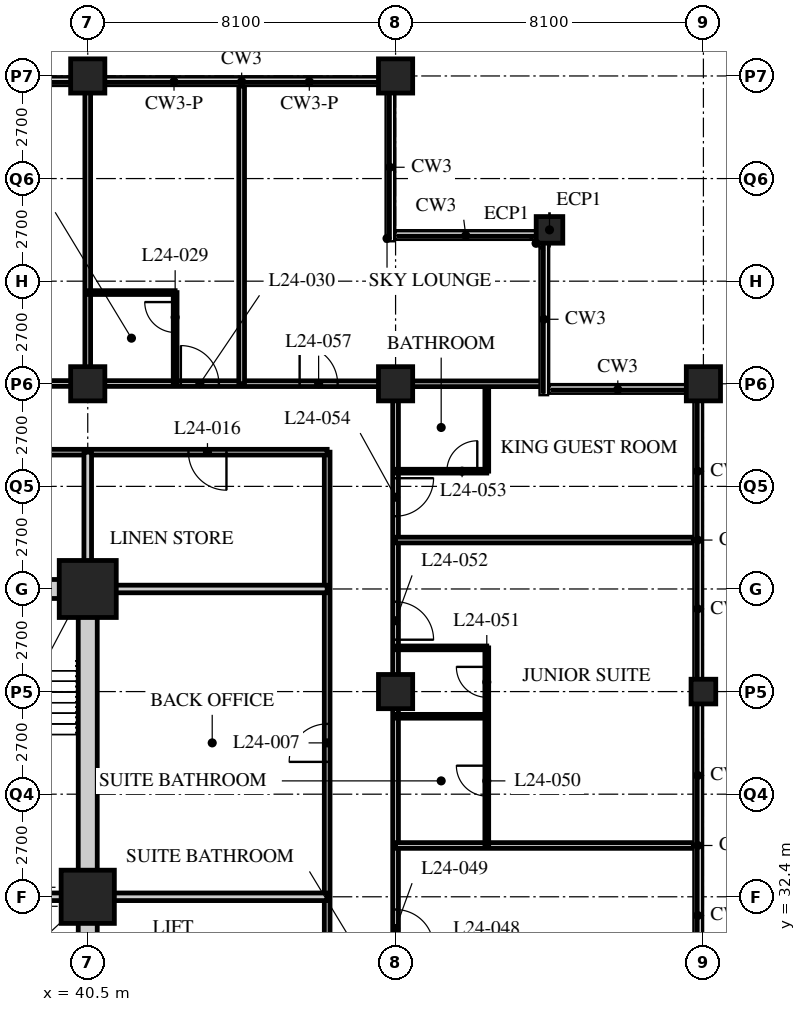
"""IFC4 building model, lengths in metres.
Left out: names, types, materials, properties, quantities, classifications, styles, units other than length and angle.
Written with IfcOpenShell. Run it as: python <this file> out.ifc"""

import sys

from ifc_helpers import new_model, si_unit, direction, frame, frame_2d, origin, origin_2d, place, context, subcontext, project, spatial, rectangle, hollow_rectangle, extrude, element, fill, save


model = new_model("IFC4")
c1 = context("Model", 3, precision=1e-05, world=origin(), true_north=direction((0.0, 1.0)))
c2 = subcontext(c1, "Body", "Model", "MODEL_VIEW")
j1 = project(units=[si_unit("LENGTHUNIT", "METRE"), si_unit("PLANEANGLEUNIT", "RADIAN")], contexts=[c1])
p1 = place(None, origin())
s1 = spatial("IfcSite", under=j1, at=p1, CompositionType="ELEMENT")
p2 = place(p1, origin())
s2 = spatial("IfcBuilding", under=s1, at=p2, CompositionType="ELEMENT")
p3 = place(p2, frame((0.0, 0.0, 98.0)))
s3 = spatial("IfcBuildingStorey", under=s2, at=p3, CompositionType="ELEMENT", Elevation=98.0)
p4 = place(p3, frame((40.5, 32.4, 0.0), z_axis=(0.0, 0.0, 1.0), x_axis=(1.0, 0.0, 0.0)))
e1 = element("IfcColumn", 1, at=p4, inside=s3, PredefinedType="COLUMN", context=c2, shape_type="SweptSolid", body=[
    extrude(hollow_rectangle(XDim=1.4, YDim=1.4, WallThickness=0.12, at=origin_2d()), origin(), (0.0, 0.0, 1.0), 5.4),
])
p5 = place(p3, frame((40.5, 40.5, 0.0), z_axis=(0.0, 0.0, 1.0), x_axis=(1.0, 0.0, 0.0)))
e2 = element("IfcColumn", 2, at=p5, inside=s3, PredefinedType="COLUMN", context=c2, shape_type="SweptSolid", body=[
    extrude(hollow_rectangle(XDim=1.5, YDim=1.5, WallThickness=0.13, at=origin_2d()), origin(), (0.0, 0.0, 1.0), 5.4),
])
p6 = place(p3, frame((40.5, 45.9, 0.0), z_axis=(0.0, 0.0, 1.0), x_axis=(1.0, 0.0, 0.0)))
e3 = element("IfcColumn", 3, at=p6, inside=s3, PredefinedType="COLUMN", context=c2, shape_type="SweptSolid", body=[
    extrude(hollow_rectangle(XDim=0.9, YDim=0.9, WallThickness=0.1, at=origin_2d()), origin(), (0.0, 0.0, 1.0), 5.4),
])
p7 = place(p3, frame((40.5, 54.0, 0.0), z_axis=(0.0, 0.0, 1.0), x_axis=(1.0, 0.0, 0.0)))
e4 = element("IfcColumn", 4, at=p7, inside=s3, PredefinedType="COLUMN", context=c2, shape_type="SweptSolid", body=[
    extrude(hollow_rectangle(XDim=0.9, YDim=0.9, WallThickness=0.09, at=origin_2d()), origin(), (0.0, 0.0, 1.0), 5.4),
])
for number, where, z_axis, x_axis in (
    (5, (48.6, 37.8, 0.0), (0.0, 0.0, 1.0), (1.0, 0.0, 0.0)),
    (6, (48.6, 45.9, 0.0), (0.0, 0.0, 1.0), (1.0, 0.0, 0.0)),
):
    element("IfcColumn", number, at=place(p3, frame(where, z_axis=z_axis, x_axis=x_axis)), inside=s3, PredefinedType="COLUMN", context=c2, shape_type="SweptSolid", body=[
        extrude(hollow_rectangle(XDim=0.9, YDim=0.9, WallThickness=0.1, at=origin_2d()), origin(), (0.0, 0.0, 1.0), 5.4),
    ])
p8 = place(p3, frame((48.6, 54.0, 0.0), z_axis=(0.0, 0.0, 1.0), x_axis=(1.0, 0.0, 0.0)))
e7 = element("IfcColumn", 7, at=p8, inside=s3, PredefinedType="COLUMN", context=c2, shape_type="SweptSolid", body=[
    extrude(hollow_rectangle(XDim=0.9, YDim=0.9, WallThickness=0.09, at=origin_2d()), origin(), (0.0, 0.0, 1.0), 5.4),
])
p9 = place(p3, frame((52.65, 49.95, 0.0), z_axis=(0.0, 0.0, 1.0), x_axis=(1.0, 0.0, 0.0)))
e8 = element("IfcColumn", 8, at=p9, inside=s3, PredefinedType="COLUMN", context=c2, shape_type="SweptSolid", body=[
    extrude(hollow_rectangle(XDim=0.7, YDim=0.7, WallThickness=0.07, at=origin_2d()), origin(), (0.0, 0.0, 1.0), 5.4),
])
p10 = place(p3, frame((56.7, 37.8, 0.0), z_axis=(0.0, 0.0, 1.0), x_axis=(1.0, 0.0, 0.0)))
e9 = element("IfcColumn", 9, at=p10, inside=s3, PredefinedType="COLUMN", context=c2, shape_type="SweptSolid", body=[
    extrude(hollow_rectangle(XDim=0.65, YDim=0.65, WallThickness=0.05, at=origin_2d()), origin(), (0.0, 0.0, 1.0), 5.4),
])
p11 = place(p3, frame((56.7, 45.9, 0.0), z_axis=(0.0, 0.0, 1.0), x_axis=(1.0, 0.0, 0.0)))
e10 = element("IfcColumn", 10, at=p11, inside=s3, PredefinedType="COLUMN", context=c2, shape_type="SweptSolid", body=[
    extrude(hollow_rectangle(XDim=0.9, YDim=0.9, WallThickness=0.09, at=origin_2d()), origin(), (0.0, 0.0, 1.0), 5.4),
])
p12 = place(p3, frame((8.1, 45.935, 0.0), z_axis=(0.0, 0.0, 1.0), x_axis=(0.99999962324, -0.000868055229, 0.0)))
e11 = element("IfcWall", 11, at=p12, inside=s3, PredefinedType="PARTITIONING", context=c2, shape_type="SweptSolid", body=[
    extrude(rectangle(XDim=40.5, YDim=0.15, at=frame_2d((20.25, 0.0))), origin(), (0.0, 0.0, 1.0), 4.49),
])
p13 = place(p12, frame((9.225, 0.0, 0.0)))
e12 = element("IfcOpeningElement", 12, at=p13, cuts=e11, PredefinedType="OPENING", context=c2, shape_type="SweptSolid", body=[
    extrude(rectangle(XDim=1.8, YDim=2.4, at=frame_2d((0.9, 1.2))), frame((0.0, 0.085, 0.0), z_axis=(0.0, -1.0, 0.0), x_axis=(1.0, 0.0, 0.0)), (0.0, 0.0, 1.0), 0.17),
])
p14 = place(p12, frame((21.65, 0.0, 0.0)))
e13 = element("IfcOpeningElement", 13, at=p14, cuts=e11, PredefinedType="OPENING", context=c2, shape_type="SweptSolid", body=[
    extrude(rectangle(XDim=1.0, YDim=2.1, at=frame_2d((0.5, 1.05))), frame((0.0, 0.085, 0.0), z_axis=(0.0, -1.0, 0.0), x_axis=(1.0, 0.0, 0.0)), (0.0, 0.0, 1.0), 0.17),
])
p15 = place(p12, frame((29.75, 0.0, 0.0)))
e14 = element("IfcOpeningElement", 14, at=p15, cuts=e11, PredefinedType="OPENING", context=c2, shape_type="SweptSolid", body=[
    extrude(rectangle(XDim=1.0, YDim=2.1, at=frame_2d((0.5, 1.05))), frame((0.0, 0.085, 0.0), z_axis=(0.0, -1.0, 0.0), x_axis=(1.0, 0.0, 0.0)), (0.0, 0.0, 1.0), 0.17),
])
p16 = place(p12, frame((34.85, 0.0, 0.0)))
e15 = element("IfcOpeningElement", 15, at=p16, cuts=e11, PredefinedType="OPENING", context=c2, shape_type="SweptSolid", body=[
    extrude(rectangle(XDim=1.0, YDim=2.1, at=frame_2d((0.5, 1.05))), frame((0.0, 0.085, 0.0), z_axis=(0.0, -1.0, 0.0), x_axis=(1.0, 0.0, 0.0)), (0.0, 0.0, 1.0), 0.17),
])
p17 = place(p12, frame((37.975, 0.0, 0.0)))
e16 = element("IfcOpeningElement", 16, at=p17, cuts=e11, PredefinedType="OPENING", context=c2, shape_type="SweptSolid", body=[
    extrude(rectangle(XDim=1.0, YDim=2.1, at=frame_2d((0.5, 1.05))), frame((0.0, 0.085, 0.0), z_axis=(0.0, -1.0, 0.0), x_axis=(1.0, 0.0, 0.0)), (0.0, 0.0, 1.0), 0.17),
])
p18 = place(p12, frame((1.525, 0.0, 0.0)))
e17 = element("IfcOpeningElement", 17, at=p18, cuts=e11, PredefinedType="OPENING", context=c2, shape_type="SweptSolid", body=[
    extrude(rectangle(XDim=1.0, YDim=2.1, at=frame_2d((0.5, 1.05))), frame((0.0, 0.085, 0.0), z_axis=(0.0, -1.0, 0.0), x_axis=(1.0, 0.0, 0.0)), (0.0, 0.0, 1.0), 0.17),
])
p19 = place(p3, frame((48.6, 13.465, 0.0), z_axis=(0.0, 0.0, 1.0), x_axis=(0.0, 1.0, 0.0)))
e18 = element("IfcWall", 18, at=p19, inside=s3, PredefinedType="PARTITIONING", context=c2, shape_type="SweptSolid", body=[
    extrude(rectangle(XDim=32.435, YDim=0.15, at=frame_2d((16.217, 0.0))), origin(), (0.0, 0.0, 1.0), 4.49),
])
p20 = place(p19, frame((1.525, 0.0, 0.0)))
e19 = element("IfcOpeningElement", 19, at=p20, cuts=e18, PredefinedType="OPENING", context=c2, shape_type="SweptSolid", body=[
    extrude(rectangle(XDim=1.0, YDim=2.1, at=frame_2d((0.5, 1.05))), frame((0.0, 0.085, 0.0), z_axis=(0.0, -1.0, 0.0), x_axis=(1.0, 0.0, 0.0)), (0.0, 0.0, 1.0), 0.17),
])
p21 = place(p19, frame((9.5, 0.0, 0.0)))
e20 = element("IfcOpeningElement", 20, at=p21, cuts=e18, PredefinedType="OPENING", context=c2, shape_type="SweptSolid", body=[
    extrude(rectangle(XDim=1.0, YDim=2.1, at=frame_2d((0.5, 1.05))), frame((0.0, 0.085, 0.0), z_axis=(0.0, -1.0, 0.0), x_axis=(1.0, 0.0, 0.0)), (0.0, 0.0, 1.0), 0.17),
])
p22 = place(p19, frame((17.6, 0.0, 0.0)))
e21 = element("IfcOpeningElement", 21, at=p22, cuts=e18, PredefinedType="OPENING", context=c2, shape_type="SweptSolid", body=[
    extrude(rectangle(XDim=1.0, YDim=2.1, at=frame_2d((0.5, 1.05))), frame((0.0, 0.085, 0.0), z_axis=(0.0, -1.0, 0.0), x_axis=(1.0, 0.0, 0.0)), (0.0, 0.0, 1.0), 0.17),
])
p23 = place(p19, frame((25.7, 0.0, 0.0)))
e22 = element("IfcOpeningElement", 22, at=p23, cuts=e18, PredefinedType="OPENING", context=c2, shape_type="SweptSolid", body=[
    extrude(rectangle(XDim=1.0, YDim=2.1, at=frame_2d((0.5, 1.05))), frame((0.0, 0.085, 0.0), z_axis=(0.0, -1.0, 0.0), x_axis=(1.0, 0.0, 0.0)), (0.0, 0.0, 1.0), 0.17),
])
p24 = place(p19, frame((28.95, 0.0, 0.0)))
e23 = element("IfcOpeningElement", 23, at=p24, cuts=e18, PredefinedType="OPENING", context=c2, shape_type="SweptSolid", body=[
    extrude(rectangle(XDim=1.0, YDim=2.1, at=frame_2d((0.5, 1.05))), frame((0.0, 0.085, 0.0), z_axis=(0.0, -1.0, 0.0), x_axis=(1.0, 0.0, 0.0)), (0.0, 0.0, 1.0), 0.17),
])
p25 = place(p3, frame((46.8, 15.3, 0.0), z_axis=(0.0, 0.0, 1.0), x_axis=(0.0, 1.0, 0.0)))
e24 = element("IfcWall", 24, at=p25, inside=s3, PredefinedType="PARTITIONING", context=c2, shape_type="SweptSolid", body=[
    extrude(rectangle(XDim=28.8, YDim=0.15, at=frame_2d((14.4, 0.0))), origin(), (0.0, 0.0, 1.0), 5.19),
])
p26 = place(p25, frame((9.775, 0.0, 0.0)))
e25 = element("IfcOpeningElement", 25, at=p26, cuts=e24, PredefinedType="OPENING", context=c2, shape_type="SweptSolid", body=[
    extrude(rectangle(XDim=0.85, YDim=2.1, at=frame_2d((0.425, 1.05))), frame((0.0, 0.085, 0.0), z_axis=(0.0, -1.0, 0.0), x_axis=(1.0, 0.0, 0.0)), (0.0, 0.0, 1.0), 0.17),
])
p27 = place(p25, frame((13.75, 0.0, 0.0)))
e26 = element("IfcOpeningElement", 26, at=p27, cuts=e24, PredefinedType="OPENING", context=c2, shape_type="SweptSolid", body=[
    extrude(rectangle(XDim=1.0, YDim=2.1, at=frame_2d((0.5, 1.05))), frame((0.0, 0.085, 0.0), z_axis=(0.0, -1.0, 0.0), x_axis=(1.0, 0.0, 0.0)), (0.0, 0.0, 1.0), 0.17),
])
p28 = place(p25, frame((20.65, 0.0, 0.0)))
e27 = element("IfcOpeningElement", 27, at=p28, cuts=e24, PredefinedType="OPENING", context=c2, shape_type="SweptSolid", body=[
    extrude(rectangle(XDim=1.0, YDim=2.1, at=frame_2d((0.5, 1.05))), frame((0.0, 0.085, 0.0), z_axis=(0.0, -1.0, 0.0), x_axis=(1.0, 0.0, 0.0)), (0.0, 0.0, 1.0), 0.17),
])
p29 = place(p3, frame((46.8, 44.1, 0.0), z_axis=(0.0, 0.0, 1.0), x_axis=(-1.0, 0.0, 0.0)))
e28 = element("IfcWall", 28, at=p29, inside=s3, PredefinedType="PARTITIONING", context=c2, shape_type="SweptSolid", body=[
    extrude(rectangle(XDim=17.24, YDim=0.15, at=frame_2d((8.62, 0.0))), origin(), (0.0, 0.0, 1.0), 5.19),
])
p30 = place(p29, frame((11.275, 0.0, 0.0)))
e29 = element("IfcOpeningElement", 29, at=p30, cuts=e28, PredefinedType="OPENING", context=c2, shape_type="SweptSolid", body=[
    extrude(rectangle(XDim=1.0, YDim=2.1, at=frame_2d((0.5, 1.05))), frame((0.0, 0.085, 0.0), z_axis=(0.0, -1.0, 0.0), x_axis=(1.0, 0.0, 0.0)), (0.0, 0.0, 1.0), 0.17),
])
p31 = place(p29, frame((2.65, 0.0, 0.0)))
e30 = element("IfcOpeningElement", 30, at=p31, cuts=e28, PredefinedType="OPENING", context=c2, shape_type="SweptSolid", body=[
    extrude(rectangle(XDim=1.0, YDim=2.1, at=frame_2d((0.5, 1.05))), frame((0.0, 0.085, 0.0), z_axis=(0.0, -1.0, 0.0), x_axis=(1.0, 0.0, 0.0)), (0.0, 0.0, 1.0), 0.17),
])
p32 = place(p3, frame((40.5, 32.4, 0.0), z_axis=(0.0, 0.0, 1.0), x_axis=(1.0, 0.0, 0.0)))
e31 = element("IfcWall", 31, at=p32, inside=s3, PredefinedType="SOLIDWALL", context=c2, shape_type="SweptSolid", body=[
    extrude(rectangle(XDim=6.3, YDim=0.2, at=frame_2d((3.15, 0.0))), origin(), (0.0, 0.0, 1.0), 5.19),
])
p33 = place(p3, frame((40.5, 40.5, 0.0), z_axis=(0.0, 0.0, 1.0), x_axis=(0.0, 1.0, 0.0)))
e32 = element("IfcWall", 32, at=p33, inside=s3, PredefinedType="SOLIDWALL", context=c2, shape_type="SweptSolid", body=[
    extrude(rectangle(XDim=3.6, YDim=0.2, at=frame_2d((1.8, 0.0))), origin(), (0.0, 0.0, 1.0), 4.49),
])
p34 = place(p3, frame((40.5, 40.5, 0.0), z_axis=(0.0, 0.0, 1.0), x_axis=(1.0, 0.0, 0.0)))
e33 = element("IfcWall", 33, at=p34, inside=s3, PredefinedType="SOLIDWALL", context=c2, shape_type="SweptSolid", body=[
    extrude(rectangle(XDim=6.3, YDim=0.2, at=frame_2d((3.15, 0.0))), origin(), (0.0, 0.0, 1.0), 5.19),
])
p35 = place(p3, frame((40.5, 45.9, 0.0), z_axis=(0.0, 0.0, 1.0), x_axis=(0.0, 1.0, 0.0)))
e34 = element("IfcWall", 34, at=p35, inside=s3, PredefinedType="PARTITIONING", context=c2, shape_type="SweptSolid", body=[
    extrude(rectangle(XDim=7.8, YDim=0.15, at=frame_2d((3.9, 0.0))), origin(), (0.0, 0.0, 1.0), 4.49),
])
p36 = place(p3, frame((40.5, 48.3, 0.0), z_axis=(0.0, 0.0, 1.0), x_axis=(1.0, 0.0, 0.0)))
e35 = element("IfcWall", 35, at=p36, inside=s3, PredefinedType="PARTITIONING", context=c2, shape_type="SweptSolid", body=[
    extrude(rectangle(XDim=2.3, YDim=0.1, at=frame_2d((1.15, 0.0))), origin(), (0.0, 0.0, 1.0), 5.19),
])
p37 = place(p3, frame((42.8, 45.9, 0.0), z_axis=(0.0, 0.0, 1.0), x_axis=(0.0, 1.0, 0.0)))
e36 = element("IfcWall", 36, at=p37, inside=s3, PredefinedType="PARTITIONING", context=c2, shape_type="SweptSolid", body=[
    extrude(rectangle(XDim=2.4, YDim=0.1, at=frame_2d((1.2, 0.0))), origin(), (0.0, 0.0, 1.0), 5.19),
])
p38 = place(p37, frame((1.35, 0.0, 0.0)))
e37 = element("IfcOpeningElement", 37, at=p38, cuts=e36, PredefinedType="OPENING", context=c2, shape_type="SweptSolid", body=[
    extrude(rectangle(XDim=0.8, YDim=2.1, at=frame_2d((0.4, 1.05))), frame((0.0, 0.06, 0.0), z_axis=(0.0, -1.0, 0.0), x_axis=(1.0, 0.0, 0.0)), (0.0, 0.0, 1.0), 0.12),
])
p39 = place(p3, frame((48.6, 33.75, 0.0), z_axis=(0.0, 0.0, 1.0), x_axis=(1.0, 0.0, 0.0)))
e38 = element("IfcWall", 38, at=p39, inside=s3, PredefinedType="PARTITIONING", context=c2, shape_type="SweptSolid", body=[
    extrude(rectangle(XDim=7.834, YDim=0.15, at=frame_2d((3.917, 0.0))), origin(), (0.0, 0.0, 1.0), 5.19),
])
p40 = place(p3, frame((51.0, 33.75, 0.0), z_axis=(0.0, 0.0, 1.0), x_axis=(0.0, 1.0, 0.0)))
e39 = element("IfcWall", 39, at=p40, inside=s3, PredefinedType="PARTITIONING", context=c2, shape_type="SweptSolid", body=[
    extrude(rectangle(XDim=5.2, YDim=0.1, at=frame_2d((2.6, 0.0))), origin(), (0.0, 0.0, 1.0), 5.19),
])
p41 = place(p40, frame((1.3, 0.0, 0.0)))
e40 = element("IfcOpeningElement", 40, at=p41, cuts=e39, PredefinedType="OPENING", context=c2, shape_type="SweptSolid", body=[
    extrude(rectangle(XDim=0.8, YDim=2.1, at=frame_2d((0.4, 1.05))), frame((0.0, 0.06, 0.0), z_axis=(0.0, -1.0, 0.0), x_axis=(1.0, 0.0, 0.0)), (0.0, 0.0, 1.0), 0.12),
])
p42 = place(p40, frame((3.9, 0.0, 0.0)))
e41 = element("IfcOpeningElement", 41, at=p42, cuts=e39, PredefinedType="OPENING", context=c2, shape_type="SweptSolid", body=[
    extrude(rectangle(XDim=0.8, YDim=2.1, at=frame_2d((0.4, 1.05))), frame((0.0, 0.06, 0.0), z_axis=(0.0, -1.0, 0.0), x_axis=(1.0, 0.0, 0.0)), (0.0, 0.0, 1.0), 0.12),
])
for number, where, z_axis, x_axis in (
    (42, (48.6, 37.15, 0.0), (0.0, 0.0, 1.0), (1.0, 0.0, 0.0)),
    (43, (48.6, 38.95, 0.0), (0.0, 0.0, 1.0), (1.0, 0.0, 0.0)),
):
    element("IfcWall", number, at=place(p3, frame(where, z_axis=z_axis, x_axis=x_axis)), inside=s3, PredefinedType="PARTITIONING", context=c2, shape_type="SweptSolid", body=[
        extrude(rectangle(XDim=2.4, YDim=0.1, at=frame_2d((1.2, 0.0))), origin(), (0.0, 0.0, 1.0), 5.19),
    ])
p43 = place(p3, frame((48.6, 41.788, 0.0), z_axis=(0.0, 0.0, 1.0), x_axis=(1.0, 0.0, 0.0)))
e44 = element("IfcWall", 44, at=p43, inside=s3, PredefinedType="PARTITIONING", context=c2, shape_type="SweptSolid", body=[
    extrude(rectangle(XDim=7.834, YDim=0.15, at=frame_2d((3.917, 0.0))), origin(), (0.0, 0.0, 1.0), 5.19),
])
p44 = place(p3, frame((51.0, 43.6, 0.0), z_axis=(0.0, 0.0, 1.0), x_axis=(0.0, 1.0, 0.0)))
e45 = element("IfcWall", 45, at=p44, inside=s3, PredefinedType="PARTITIONING", context=c2, shape_type="SweptSolid", body=[
    extrude(rectangle(XDim=2.3, YDim=0.1, at=frame_2d((1.15, 0.0))), origin(), (0.0, 0.0, 1.0), 5.19),
])
p45 = place(p3, frame((48.6, 43.6, 0.0), z_axis=(0.0, 0.0, 1.0), x_axis=(1.0, 0.0, 0.0)))
e46 = element("IfcWall", 46, at=p45, inside=s3, PredefinedType="PARTITIONING", context=c2, shape_type="SweptSolid", body=[
    extrude(rectangle(XDim=2.4, YDim=0.1, at=frame_2d((1.2, 0.0))), origin(), (0.0, 0.0, 1.0), 5.19),
])
p46 = place(p45, frame((1.35, 0.0, 0.0)))
e47 = element("IfcOpeningElement", 47, at=p46, cuts=e46, PredefinedType="OPENING", context=c2, shape_type="SweptSolid", body=[
    extrude(rectangle(XDim=0.8, YDim=2.1, at=frame_2d((0.4, 1.05))), frame((0.0, 0.06, 0.0), z_axis=(0.0, -1.0, 0.0), x_axis=(1.0, 0.0, 0.0)), (0.0, 0.0, 1.0), 0.12),
])
p47 = place(p3, frame((48.6, 45.9, 0.0), z_axis=(0.0, 0.0, 1.0), x_axis=(1.0, 0.0, 0.0)))
e48 = element("IfcWall", 48, at=p47, inside=s3, PredefinedType="PARTITIONING", context=c2, shape_type="SweptSolid", body=[
    extrude(rectangle(XDim=3.88, YDim=0.15, at=frame_2d((1.94, 0.0))), origin(), (0.0, 0.0, 1.0), 4.49),
])
p48 = place(p3, frame((44.55, 45.9, 0.0), z_axis=(0.0, 0.0, 1.0), x_axis=(0.0, 1.0, 0.0)))
e49 = element("IfcWall", 49, at=p48, inside=s3, PredefinedType="PARTITIONING", context=c2, shape_type="SweptSolid", body=[
    extrude(rectangle(XDim=7.835, YDim=0.15, at=frame_2d((3.917, 0.0))), origin(), (0.0, 0.0, 1.0), 5.19),
])
p49 = place(p3, frame((15.95, 40.5, 0.0), z_axis=(0.0, 0.0, 1.0), x_axis=(1.0, 0.0, 0.0)))
e50 = element("IfcWall", 50, at=p49, inside=s3, PredefinedType="SOLIDWALL", context=c2, shape_type="SweptSolid", body=[
    extrude(rectangle(XDim=24.8, YDim=0.5, at=frame_2d((12.4, 0.0))), origin(), (0.0, 0.0, 1.0), 4.49),
])
p50 = place(p49, frame((11.5, 0.0, 0.0)))
e51 = element("IfcOpeningElement", 51, at=p50, cuts=e50, PredefinedType="OPENING", context=c2, shape_type="SweptSolid", body=[
    extrude(rectangle(XDim=1.8, YDim=2.4, at=frame_2d((0.9, 1.2))), frame((0.0, 0.26, 0.0), z_axis=(0.0, -1.0, 0.0), x_axis=(1.0, 0.0, 0.0)), (0.0, 0.0, 1.0), 0.52),
])
p51 = place(p3, frame((40.5, 24.55, 0.0), z_axis=(0.0, 0.0, 1.0), x_axis=(0.0, 1.0, 0.0)))
e52 = element("IfcWall", 52, at=p51, inside=s3, PredefinedType="SOLIDWALL", context=c2, shape_type="SweptSolid", body=[
    extrude(rectangle(XDim=15.7, YDim=0.5, at=frame_2d((7.85, 0.0))), origin(), (0.0, 0.0, 1.0), 4.49),
])
p52 = place(p3, frame((32.3, 32.4, 0.0), z_axis=(0.0, 0.0, 1.0), x_axis=(1.0, 0.0, 0.0)))
e53 = element("IfcWall", 53, at=p52, inside=s3, PredefinedType="SOLIDWALL", context=c2, shape_type="SweptSolid", body=[
    extrude(rectangle(XDim=7.95, YDim=0.2, at=frame_2d((3.975, 0.0))), origin(), (0.0, 0.0, 1.0), 4.578),
])
p53 = place(p28, origin())
e54 = element("IfcDoor", 54, at=p53, inside=s3, OperationType="SINGLE_SWING_LEFT", PredefinedType="DOOR", context=c2, shape_type="SweptSolid", body=[
    extrude(rectangle(XDim=1.0, YDim=2.1, at=frame_2d((0.5, 1.05))), frame((0.0, 0.025, 0.0), z_axis=(0.0, -1.0, 0.0), x_axis=(1.0, 0.0, 0.0)), (0.0, 0.0, 1.0), 0.05),
])
fill(e27, e54)
p54 = place(p31, origin())
e55 = element("IfcDoor", 55, at=p54, inside=s3, OperationType="SINGLE_SWING_LEFT", PredefinedType="DOOR", context=c2, shape_type="SweptSolid", body=[
    extrude(rectangle(XDim=1.0, YDim=2.1, at=frame_2d((0.5, 1.05))), frame((0.0, 0.025, 0.0), z_axis=(0.0, -1.0, 0.0), x_axis=(1.0, 0.0, 0.0)), (0.0, 0.0, 1.0), 0.05),
])
fill(e30, e55)
p55 = place(p38, origin())
e56 = element("IfcDoor", 56, at=p55, inside=s3, OperationType="SINGLE_SWING_RIGHT", PredefinedType="DOOR", context=c2, shape_type="SweptSolid", body=[
    extrude(rectangle(XDim=0.8, YDim=2.1, at=frame_2d((0.4, 1.05))), frame((0.0, 0.025, 0.0), z_axis=(0.0, -1.0, 0.0), x_axis=(1.0, 0.0, 0.0)), (0.0, 0.0, 1.0), 0.05),
])
fill(e37, e56)
p56 = place(p16, origin())
e57 = element("IfcDoor", 57, at=p56, inside=s3, OperationType="SINGLE_SWING_LEFT", PredefinedType="DOOR", context=c2, shape_type="SweptSolid", body=[
    extrude(rectangle(XDim=1.0, YDim=2.1, at=frame_2d((0.5, 1.05))), frame((0.0, 0.025, 0.0), z_axis=(0.0, -1.0, 0.0), x_axis=(1.0, 0.0, 0.0)), (0.0, 0.0, 1.0), 0.05),
])
fill(e15, e57)
p57 = place(p22, origin())
e58 = element("IfcDoor", 58, at=p57, inside=s3, OperationType="SINGLE_SWING_RIGHT", PredefinedType="DOOR", context=c2, shape_type="SweptSolid", body=[
    extrude(rectangle(XDim=1.0, YDim=2.1, at=frame_2d((0.5, 1.05))), frame((0.0, 0.025, 0.0), z_axis=(0.0, -1.0, 0.0), x_axis=(1.0, 0.0, 0.0)), (0.0, 0.0, 1.0), 0.05),
])
fill(e21, e58)
p58 = place(p41, origin())
e59 = element("IfcDoor", 59, at=p58, inside=s3, OperationType="SINGLE_SWING_RIGHT", PredefinedType="DOOR", context=c2, shape_type="SweptSolid", body=[
    extrude(rectangle(XDim=0.8, YDim=2.1, at=frame_2d((0.4, 1.05))), frame((0.0, 0.025, 0.0), z_axis=(0.0, -1.0, 0.0), x_axis=(1.0, 0.0, 0.0)), (0.0, 0.0, 1.0), 0.05),
])
fill(e40, e59)
p59 = place(p42, origin())
e60 = element("IfcDoor", 60, at=p59, inside=s3, OperationType="SINGLE_SWING_RIGHT", PredefinedType="DOOR", context=c2, shape_type="SweptSolid", body=[
    extrude(rectangle(XDim=0.8, YDim=2.1, at=frame_2d((0.4, 1.05))), frame((0.0, 0.025, 0.0), z_axis=(0.0, -1.0, 0.0), x_axis=(1.0, 0.0, 0.0)), (0.0, 0.0, 1.0), 0.05),
])
fill(e41, e60)
p60 = place(p23, origin())
e61 = element("IfcDoor", 61, at=p60, inside=s3, OperationType="SINGLE_SWING_RIGHT", PredefinedType="DOOR", context=c2, shape_type="SweptSolid", body=[
    extrude(rectangle(XDim=1.0, YDim=2.1, at=frame_2d((0.5, 1.05))), frame((0.0, 0.025, 0.0), z_axis=(0.0, -1.0, 0.0), x_axis=(1.0, 0.0, 0.0)), (0.0, 0.0, 1.0), 0.05),
])
fill(e22, e61)
p61 = place(p46, origin())
e62 = element("IfcDoor", 62, at=p61, inside=s3, OperationType="SINGLE_SWING_RIGHT", PredefinedType="DOOR", context=c2, shape_type="SweptSolid", body=[
    extrude(rectangle(XDim=0.8, YDim=2.1, at=frame_2d((0.4, 1.05))), frame((0.0, 0.025, 0.0), z_axis=(0.0, -1.0, 0.0), x_axis=(1.0, 0.0, 0.0)), (0.0, 0.0, 1.0), 0.05),
])
fill(e47, e62)
p62 = place(p24, origin())
e63 = element("IfcDoor", 63, at=p62, inside=s3, OperationType="SINGLE_SWING_LEFT", PredefinedType="DOOR", context=c2, shape_type="SweptSolid", body=[
    extrude(rectangle(XDim=1.0, YDim=2.1, at=frame_2d((0.5, 1.05))), frame((0.0, 0.025, 0.0), z_axis=(0.0, -1.0, 0.0), x_axis=(1.0, 0.0, 0.0)), (0.0, 0.0, 1.0), 0.05),
])
fill(e23, e63)
p63 = place(p17, origin())
e64 = element("IfcDoor", 64, at=p63, inside=s3, OperationType="SINGLE_SWING_LEFT", PredefinedType="DOOR", context=c2, shape_type="SweptSolid", body=[
    extrude(rectangle(XDim=1.0, YDim=2.1, at=frame_2d((0.5, 1.05))), frame((0.0, 0.025, 0.0), z_axis=(0.0, -1.0, 0.0), x_axis=(1.0, 0.0, 0.0)), (0.0, 0.0, 1.0), 0.05),
])
fill(e16, e64)
save(model, sys.argv[1])
